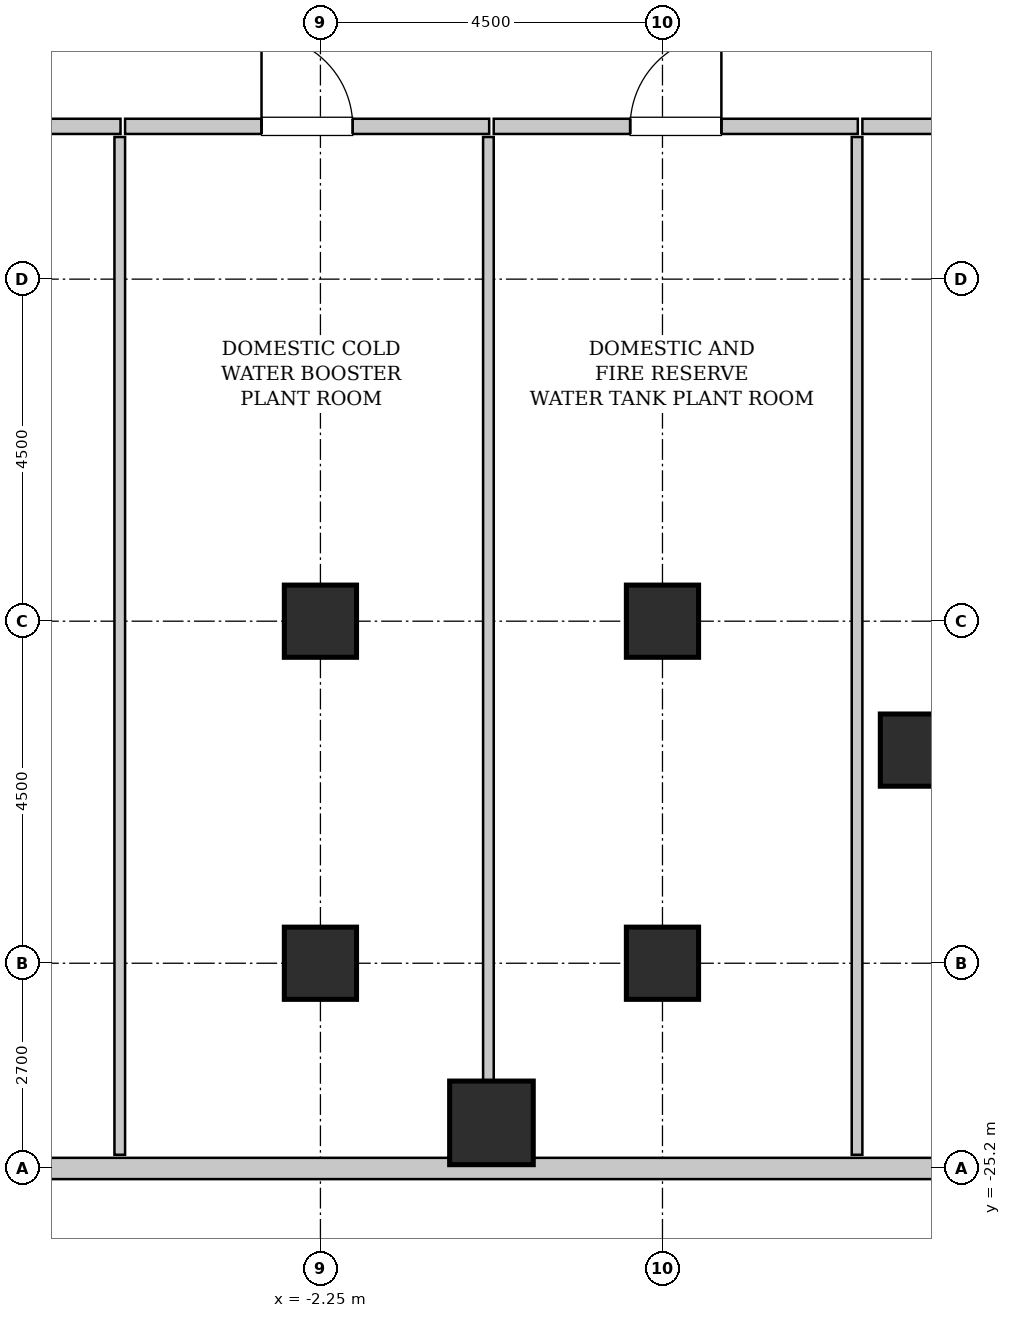
"""IFC4 building model, lengths in metres.
Left out: names, types, materials, properties, quantities, classifications, styles, units other than length and angle.
Written with IfcOpenShell. Run it as: python <this file> out.ifc"""

import sys

from ifc_helpers import new_model, si_unit, direction, frame, frame_2d, origin, origin_2d, place, context, subcontext, project, spatial, rectangle, hollow_rectangle, extrude, source, transform, mapped, element, fill, save


model = new_model("IFC4")
c1 = context("Model", 3, precision=1e-05, world=origin(), true_north=direction((0.0, 1.0)))
c2 = subcontext(c1, "Body", "Model", "MODEL_VIEW")
j1 = project(units=[si_unit("LENGTHUNIT", "METRE"), si_unit("PLANEANGLEUNIT", "RADIAN")], contexts=[c1])
p1 = place(None, origin())
s1 = spatial("IfcSite", under=j1, at=p1, CompositionType="ELEMENT")
p2 = place(p1, origin())
s2 = spatial("IfcBuilding", under=s1, at=p2, CompositionType="ELEMENT")
p3 = place(p2, frame((0.0, 0.0, 27.6)))
s3 = spatial("IfcBuildingStorey", under=s2, at=p3, CompositionType="ELEMENT", Elevation=27.6)
m1 = source(origin(), c2, "Body", "SweptSolid", [
    extrude(hollow_rectangle(XDim=1.1, YDim=1.1, WallThickness=0.055, InnerFilletRadius=0.055, OuterFilletRadius=0.11, at=origin_2d()), origin(), (0.0, 0.0, 1.0), 5.4),
])
p4 = place(p3, frame((0.0, -24.6, 0.0), z_axis=(0.0, 0.0, 1.0), x_axis=(1.0, 0.0, 0.0)))
e1 = element("IfcColumn", 1, at=p4, inside=s3, PredefinedType="COLUMN", context=c2, shape_type="MappedRepresentation", body=[
    mapped(m1, transform((0.0, 0.0, 0.0), x_axis=(1.0, 0.0, 0.0), y_axis=(0.0, 1.0, 0.0), z_axis=(0.0, 0.0, 1.0), scale=1.0)),
])
m2 = source(origin(), c2, "Body", "SweptSolid", [
    extrude(hollow_rectangle(XDim=0.95, YDim=0.95, WallThickness=0.045, InnerFilletRadius=0.045, OuterFilletRadius=0.09, at=origin_2d()), origin(), (0.0, 0.0, 1.0), 5.4),
])
for number, where, z_axis, x_axis in (
    (2, (-2.25, -22.5, 0.0), (0.0, 0.0, 1.0), (1.0, 0.0, 0.0)),
    (3, (-2.25, -18.0, 0.0), (0.0, 0.0, 1.0), (1.0, 0.0, 0.0)),
    (4, (2.25, -22.5, 0.0), (0.0, 0.0, 1.0), (1.0, 0.0, 0.0)),
    (5, (2.25, -18.0, 0.0), (0.0, 0.0, 1.0), (1.0, 0.0, 0.0)),
    (6, (5.591, -19.696, 0.0), (0.0, 0.0, 1.0), (1.0, 0.0, 0.0)),
):
    element("IfcColumn", number, at=place(p3, frame(where, z_axis=z_axis, x_axis=x_axis)), inside=s3, PredefinedType="COLUMN", context=c2, shape_type="MappedRepresentation", body=[
        mapped(m2, transform((0.0, 0.0, 0.0), x_axis=(1.0, 0.0, 0.0), y_axis=(0.0, 1.0, 0.0), z_axis=(0.0, 0.0, 1.0), scale=1.0)),
    ])
m3 = source(origin(), c2, "Body", "SweptSolid", [
    extrude(rectangle(XDim=76.5, YDim=0.28, at=frame_2d((38.25, 0.0))), origin(), (0.0, 0.0, 1.0), 5.15),
])
p5 = place(p3, frame((-38.25, -25.2, 0.0), z_axis=(0.0, 0.0, 1.0), x_axis=(1.0, 0.0, 0.0)))
e7 = element("IfcWall", 7, at=p5, inside=s3, PredefinedType="SOLIDWALL", context=c2, shape_type="MappedRepresentation", body=[
    mapped(m3, transform((0.0, 0.0, 0.0), x_axis=(1.0, 0.0, 0.0), y_axis=(0.0, 1.0, 0.0), z_axis=(0.0, 0.0, 1.0), scale=1.0)),
])
m4 = source(origin(), c2, "Body", "SweptSolid", [
    extrude(rectangle(XDim=4.54, YDim=0.2, at=frame_2d((2.27, 0.0))), origin(), (0.0, 0.0, 1.0), 5.135),
])
p6 = place(p3, frame((-9.42, -11.49, 0.0), z_axis=(0.0, 0.0, 1.0), x_axis=(1.0, 0.0, 0.0)))
e8 = element("IfcWall", 8, at=p6, inside=s3, PredefinedType="SOLIDWALL", context=c2, shape_type="MappedRepresentation", body=[
    mapped(m4, transform((0.0, 0.0, 0.0), x_axis=(1.0, 0.0, 0.0), y_axis=(0.0, 1.0, 0.0), z_axis=(0.0, 0.0, 1.0), scale=1.0)),
])
p7 = place(p6, frame((1.67, 0.0, 0.0)))
e9 = element("IfcOpeningElement", 9, at=p7, cuts=e8, PredefinedType="OPENING", context=c2, shape_type="SweptSolid", body=[
    extrude(rectangle(XDim=1.2, YDim=2.15, at=frame_2d((0.6, 1.075))), frame((0.0, 0.11, 0.0), z_axis=(0.0, -1.0, 0.0), x_axis=(1.0, 0.0, 0.0)), (0.0, 0.0, 1.0), 0.22),
])
m5 = source(origin(), c2, "Body", "SweptSolid", [
    extrude(rectangle(XDim=13.39, YDim=0.14, at=frame_2d((6.695, 0.0))), origin(), (0.0, 0.0, 1.0), 5.135),
])
p8 = place(p3, frame((-4.89, -25.02, 0.0), z_axis=(0.0, 0.0, 1.0), x_axis=(0.0, 1.0, 0.0)))
e10 = element("IfcWall", 10, at=p8, inside=s3, PredefinedType="PARTITIONING", context=c2, shape_type="MappedRepresentation", body=[
    mapped(m5, transform((0.0, 0.0, 0.0), x_axis=(1.0, 0.0, 0.0), y_axis=(0.0, 1.0, 0.0), z_axis=(0.0, 0.0, 1.0), scale=1.0)),
])
m6 = source(origin(), c2, "Body", "SweptSolid", [
    extrude(rectangle(XDim=4.79, YDim=0.2, at=frame_2d((2.395, 0.0))), origin(), (0.0, 0.0, 1.0), 5.135),
])
p9 = place(p3, frame((-4.82, -11.49, 0.0), z_axis=(0.0, 0.0, 1.0), x_axis=(1.0, 0.0, 0.0)))
e11 = element("IfcWall", 11, at=p9, inside=s3, PredefinedType="SOLIDWALL", context=c2, shape_type="MappedRepresentation", body=[
    mapped(m6, transform((0.0, 0.0, 0.0), x_axis=(1.0, 0.0, 0.0), y_axis=(0.0, 1.0, 0.0), z_axis=(0.0, 0.0, 1.0), scale=1.0)),
])
p10 = place(p9, frame((1.795, 0.0, 0.0)))
e12 = element("IfcOpeningElement", 12, at=p10, cuts=e11, PredefinedType="OPENING", context=c2, shape_type="SweptSolid", body=[
    extrude(rectangle(XDim=1.2, YDim=2.15, at=frame_2d((0.6, 1.075))), frame((0.0, 0.11, 0.0), z_axis=(0.0, -1.0, 0.0), x_axis=(1.0, 0.0, 0.0)), (0.0, 0.0, 1.0), 0.22),
])
p11 = place(p3, frame((-0.04, -25.02, 0.0), z_axis=(0.0, 0.0, 1.0), x_axis=(0.0, 1.0, 0.0)))
e13 = element("IfcWall", 13, at=p11, inside=s3, PredefinedType="PARTITIONING", context=c2, shape_type="MappedRepresentation", body=[
    mapped(m5, transform((0.0, 0.0, 0.0), x_axis=(1.0, 0.0, 0.0), y_axis=(0.0, 1.0, 0.0), z_axis=(0.0, 0.0, 1.0), scale=1.0)),
])
p12 = place(p3, frame((0.03, -11.49, 0.0), z_axis=(0.0, 0.0, 1.0), x_axis=(1.0, 0.0, 0.0)))
e14 = element("IfcWall", 14, at=p12, inside=s3, PredefinedType="SOLIDWALL", context=c2, shape_type="MappedRepresentation", body=[
    mapped(m6, transform((0.0, 0.0, 0.0), x_axis=(1.0, 0.0, 0.0), y_axis=(0.0, 1.0, 0.0), z_axis=(0.0, 0.0, 1.0), scale=1.0)),
])
p13 = place(p12, frame((1.795, 0.0, 0.0)))
e15 = element("IfcOpeningElement", 15, at=p13, cuts=e14, PredefinedType="OPENING", context=c2, shape_type="SweptSolid", body=[
    extrude(rectangle(XDim=1.2, YDim=2.15, at=frame_2d((0.6, 1.075))), frame((0.0, 0.11, 0.0), z_axis=(0.0, -1.0, 0.0), x_axis=(1.0, 0.0, 0.0)), (0.0, 0.0, 1.0), 0.22),
])
p14 = place(p3, frame((4.81, -25.02, 0.0), z_axis=(0.0, 0.0, 1.0), x_axis=(0.0, 1.0, 0.0)))
e16 = element("IfcWall", 16, at=p14, inside=s3, PredefinedType="PARTITIONING", context=c2, shape_type="MappedRepresentation", body=[
    mapped(m5, transform((0.0, 0.0, 0.0), x_axis=(1.0, 0.0, 0.0), y_axis=(0.0, 1.0, 0.0), z_axis=(0.0, 0.0, 1.0), scale=1.0)),
])
p15 = place(p3, frame((4.88, -11.49, 0.0), z_axis=(0.0, 0.0, 1.0), x_axis=(1.0, 0.0, 0.0)))
e17 = element("IfcWall", 17, at=p15, inside=s3, PredefinedType="SOLIDWALL", context=c2, shape_type="MappedRepresentation", body=[
    mapped(m4, transform((0.0, 0.0, 0.0), x_axis=(1.0, 0.0, 0.0), y_axis=(0.0, 1.0, 0.0), z_axis=(0.0, 0.0, 1.0), scale=1.0)),
])
p16 = place(p15, frame((1.67, 0.0, 0.0)))
e18 = element("IfcOpeningElement", 18, at=p16, cuts=e17, PredefinedType="OPENING", context=c2, shape_type="SweptSolid", body=[
    extrude(rectangle(XDim=1.2, YDim=2.15, at=frame_2d((0.6, 1.075))), frame((0.0, 0.11, 0.0), z_axis=(0.0, -1.0, 0.0), x_axis=(1.0, 0.0, 0.0)), (0.0, 0.0, 1.0), 0.22),
])
m7 = source(origin(), c2, "Body", "SweptSolid", [
    extrude(rectangle(XDim=1.2, YDim=2.15, at=frame_2d((0.6, 1.075))), frame((0.0, 0.025, 0.0), z_axis=(0.0, -1.0, 0.0), x_axis=(1.0, 0.0, 0.0)), (0.0, 0.0, 1.0), 0.05),
])
p17 = place(p10, origin())
e19 = element("IfcDoor", 19, at=p17, inside=s3, OperationType="SINGLE_SWING_LEFT", PredefinedType="DOOR", context=c2, shape_type="MappedRepresentation", body=[
    mapped(m7, transform((0.0, 0.0, 0.0), x_axis=(1.0, 0.0, 0.0), y_axis=(0.0, 1.0, 0.0), z_axis=(0.0, 0.0, 1.0), scale=1.0)),
])
fill(e12, e19)
p18 = place(p13, origin())
e20 = element("IfcDoor", 20, at=p18, inside=s3, OperationType="SINGLE_SWING_RIGHT", PredefinedType="DOOR", context=c2, shape_type="MappedRepresentation", body=[
    mapped(m7, transform((0.0, 0.0, 0.0), x_axis=(1.0, 0.0, 0.0), y_axis=(0.0, 1.0, 0.0), z_axis=(0.0, 0.0, 1.0), scale=1.0)),
])
fill(e15, e20)
save(model, sys.argv[1])
